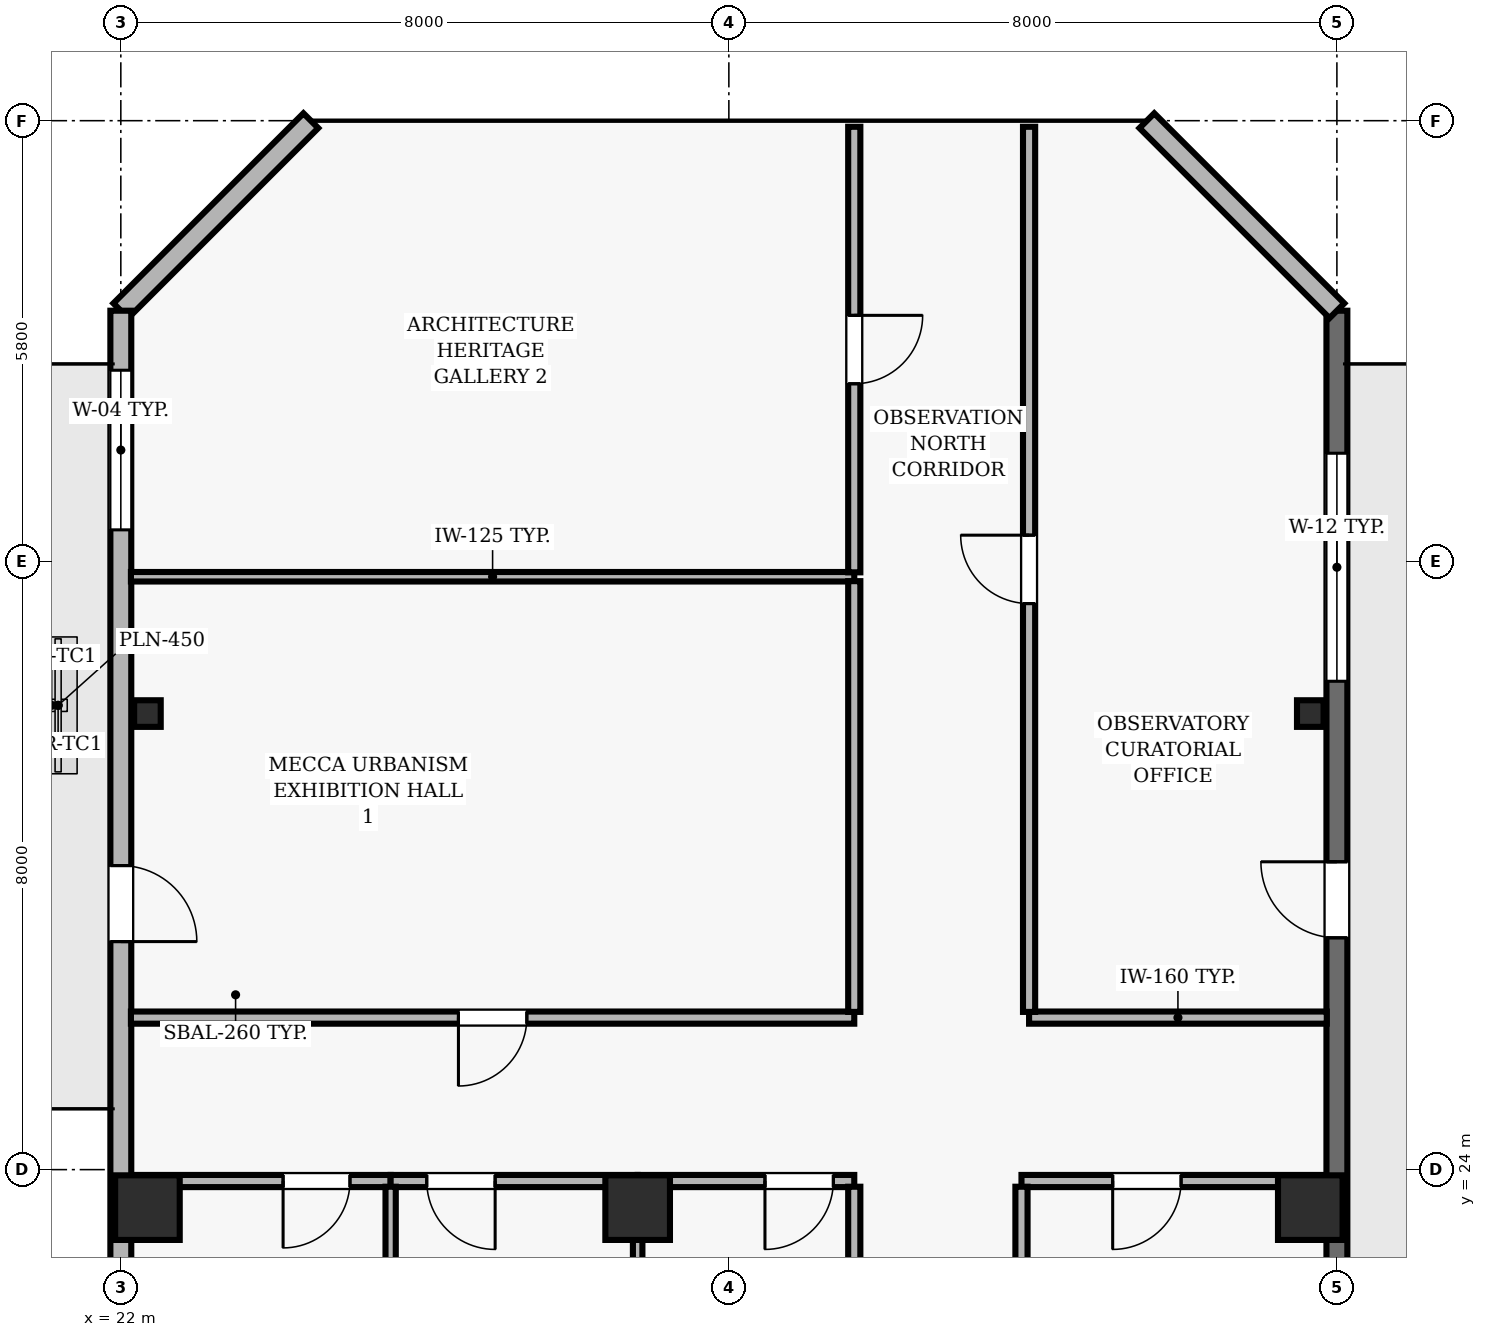
"""IFC4 building model, lengths in metres.
Left out: names, types, materials, properties, quantities, classifications, styles, units other than length and angle.
Written with IfcOpenShell. Run it as: python <this file> out.ifc"""

import sys

from ifc_helpers import new_model, si_unit, direction, frame, frame_2d, origin, origin_2d, place, context, subcontext, project, spatial, rectangle, hollow_rectangle, extrude, element, fill, save


model = new_model("IFC4")
c1 = context("Model", 3, precision=1e-05, world=origin(), true_north=direction((0.0, 1.0)))
c2 = subcontext(c1, "Body", "Model", "MODEL_VIEW")
j1 = project(units=[si_unit("LENGTHUNIT", "METRE"), si_unit("PLANEANGLEUNIT", "RADIAN")], contexts=[c1])
p1 = place(None, origin())
s1 = spatial("IfcSite", under=j1, at=p1, CompositionType="ELEMENT")
p2 = place(p1, origin())
s2 = spatial("IfcBuilding", under=s1, at=p2, CompositionType="ELEMENT")
p3 = place(p2, frame((0.0, 0.0, 306.7)))
s3 = spatial("IfcBuildingStorey", under=s2, at=p3, CompositionType="ELEMENT", Elevation=306.7)
for number, where, z_axis, x_axis in (
    (1, (22.35, 23.5, 0.0), (0.0, 0.0, 1.0), (1.0, 0.0, 0.0)),
    (2, (28.8, 23.5, 0.0), (0.0, 0.0, 1.0), (1.0, 0.0, 0.0)),
    (3, (37.65, 23.5, 0.0), (0.0, 0.0, 1.0), (1.0, 0.0, 0.0)),
):
    element("IfcColumn", number, at=place(p3, frame(where, z_axis=z_axis, x_axis=x_axis)), inside=s3, PredefinedType="COLUMN", context=c2, shape_type="SweptSolid", body=[
        extrude(rectangle(XDim=0.85, YDim=0.85, at=origin_2d()), origin(), (0.0, 0.0, 1.0), 5.0),
    ])
for number, where, z_axis, x_axis in (
    (4, (22.35, 30.0, 0.0), (0.0, 0.0, 1.0), (1.0, 0.0, 0.0)),
    (5, (37.65, 30.0, 0.0), (0.0, 0.0, 1.0), (1.0, 0.0, 0.0)),
):
    element("IfcColumn", number, at=place(p3, frame(where, z_axis=z_axis, x_axis=x_axis)), inside=s3, PredefinedType="COLUMN", context=c2, shape_type="SweptSolid", body=[
        extrude(hollow_rectangle(XDim=0.35, YDim=0.35, WallThickness=0.016, at=origin_2d()), origin(), (0.0, 0.0, 1.0), 5.0),
    ])
p4 = place(p3, frame((38.0, 21.8, 0.0), z_axis=(0.0, 0.0, 1.0), x_axis=(0.0, 1.0, 0.0)))
e6 = element("IfcWall", 6, at=p4, inside=s3, PredefinedType="SOLIDWALL", context=c2, shape_type="SweptSolid", body=[
    extrude(rectangle(XDim=13.5, YDim=0.275, at=frame_2d((6.75, 0.0))), origin(), (0.0, 0.0, 1.0), 4.74),
])
p5 = place(p4, frame((5.25, 0.0, 0.0)))
e7 = element("IfcOpeningElement", 7, at=p5, cuts=e6, PredefinedType="OPENING", context=c2, shape_type="SweptSolid", body=[
    extrude(rectangle(XDim=1.0, YDim=2.2, at=frame_2d((0.5, 1.1))), frame((0.0, 0.147, 0.0), z_axis=(0.0, -1.0, 0.0), x_axis=(1.0, 0.0, 0.0)), (0.0, 0.0, 1.0), 0.295),
])
p6 = place(p4, frame((8.625, 0.0, 0.9)))
e8 = element("IfcOpeningElement", 8, at=p6, cuts=e6, PredefinedType="OPENING", context=c2, shape_type="SweptSolid", body=[
    extrude(rectangle(XDim=3.0, YDim=2.2, at=frame_2d((1.5, 1.1))), frame((0.0, 0.147, 0.0), z_axis=(0.0, -1.0, 0.0), x_axis=(1.0, 0.0, 0.0)), (0.0, 0.0, 1.0), 0.295),
])
for number, where, z_axis, x_axis in (
    (9, (38.0, 35.3, 0.0), (0.0, 0.0, 1.0), (-0.707, 0.707, 0.0)),
    (10, (24.5, 37.8, 0.0), (0.0, 0.0, 1.0), (-0.707, -0.707, 0.0)),
):
    element("IfcWall", number, at=place(p3, frame(where, z_axis=z_axis, x_axis=x_axis)), inside=s3, PredefinedType="SOLIDWALL", context=c2, shape_type="SweptSolid", body=[
        extrude(rectangle(XDim=3.536, YDim=0.275, at=frame_2d((1.768, 0.0))), origin(), (0.0, 0.0, 1.0), 4.74),
    ])
p7 = place(p3, frame((22.0, 35.3, 0.0), z_axis=(0.0, 0.0, 1.0), x_axis=(0.0, -1.0, 0.0)))
e11 = element("IfcWall", 11, at=p7, inside=s3, PredefinedType="SOLIDWALL", context=c2, shape_type="SweptSolid", body=[
    extrude(rectangle(XDim=32.8, YDim=0.275, at=frame_2d((16.4, 0.0))), origin(), (0.0, 0.0, 1.0), 4.74),
])
p8 = place(p7, frame((7.3, 0.0, 0.0)))
e12 = element("IfcOpeningElement", 12, at=p8, cuts=e11, PredefinedType="OPENING", context=c2, shape_type="SweptSolid", body=[
    extrude(rectangle(XDim=1.0, YDim=2.2, at=frame_2d((0.5, 1.1))), frame((0.0, 0.147, 0.0), z_axis=(0.0, -1.0, 0.0), x_axis=(1.0, 0.0, 0.0)), (0.0, 0.0, 1.0), 0.295),
])
p9 = place(p7, frame((0.783, 0.0, 0.9)))
e13 = element("IfcOpeningElement", 13, at=p9, cuts=e11, PredefinedType="OPENING", context=c2, shape_type="SweptSolid", body=[
    extrude(rectangle(XDim=2.1, YDim=1.6, at=frame_2d((1.05, 0.8))), frame((0.0, 0.147, 0.0), z_axis=(0.0, -1.0, 0.0), x_axis=(1.0, 0.0, 0.0)), (0.0, 0.0, 1.0), 0.295),
])
p10 = place(p7, frame((12.617, 0.0, 0.9)))
e14 = element("IfcOpeningElement", 14, at=p10, cuts=e11, PredefinedType="OPENING", context=c2, shape_type="SweptSolid", body=[
    extrude(rectangle(XDim=2.1, YDim=1.6, at=frame_2d((1.05, 0.8))), frame((0.0, 0.147, 0.0), z_axis=(0.0, -1.0, 0.0), x_axis=(1.0, 0.0, 0.0)), (0.0, 0.0, 1.0), 0.295),
])
p11 = place(p7, frame((17.633, 0.0, 0.9)))
e15 = element("IfcOpeningElement", 15, at=p11, cuts=e11, PredefinedType="OPENING", context=c2, shape_type="SweptSolid", body=[
    extrude(rectangle(XDim=2.1, YDim=1.6, at=frame_2d((1.05, 0.8))), frame((0.0, 0.147, 0.0), z_axis=(0.0, -1.0, 0.0), x_axis=(1.0, 0.0, 0.0)), (0.0, 0.0, 1.0), 0.295),
])
p12 = place(p7, frame((23.55, 0.0, 0.9)))
e16 = element("IfcOpeningElement", 16, at=p12, cuts=e11, PredefinedType="OPENING", context=c2, shape_type="SweptSolid", body=[
    extrude(rectangle(XDim=2.1, YDim=1.6, at=frame_2d((1.05, 0.8))), frame((0.0, 0.147, 0.0), z_axis=(0.0, -1.0, 0.0), x_axis=(1.0, 0.0, 0.0)), (0.0, 0.0, 1.0), 0.295),
])
p13 = place(p3, frame((25.55, 23.85, 0.0), z_axis=(0.0, 0.0, 1.0), x_axis=(-1.0, 0.0, 0.0)))
e17 = element("IfcWall", 17, at=p13, inside=s3, PredefinedType="PARTITIONING", context=c2, shape_type="SweptSolid", body=[
    extrude(rectangle(XDim=3.35, YDim=0.16, at=frame_2d((1.675, 0.0))), origin(), (0.0, 0.0, 1.0), 4.277),
])
p14 = place(p13, frame((0.535, 0.0, 0.0)))
e18 = element("IfcOpeningElement", 18, at=p14, cuts=e17, PredefinedType="OPENING", context=c2, shape_type="SweptSolid", body=[
    extrude(rectangle(XDim=0.88, YDim=2.1, at=frame_2d((0.44, 1.05))), frame((0.0, 0.09, 0.0), z_axis=(0.0, -1.0, 0.0), x_axis=(1.0, 0.0, 0.0)), (0.0, 0.0, 1.0), 0.18),
])
p15 = place(p3, frame((28.8, 23.85, 0.0), z_axis=(0.0, 0.0, 1.0), x_axis=(-1.0, 0.0, 0.0)))
e19 = element("IfcWall", 19, at=p15, inside=s3, PredefinedType="PARTITIONING", context=c2, shape_type="SweptSolid", body=[
    extrude(rectangle(XDim=3.25, YDim=0.16, at=frame_2d((1.625, 0.0))), origin(), (0.0, 0.0, 1.0), 4.277),
])
p16 = place(p15, frame((1.875, 0.0, 0.0)))
e20 = element("IfcOpeningElement", 20, at=p16, cuts=e19, PredefinedType="OPENING", context=c2, shape_type="SweptSolid", body=[
    extrude(rectangle(XDim=0.9, YDim=2.1, at=frame_2d((0.45, 1.05))), frame((0.0, 0.09, 0.0), z_axis=(0.0, -1.0, 0.0), x_axis=(1.0, 0.0, 0.0)), (0.0, 0.0, 1.0), 0.18),
])
p17 = place(p3, frame((31.65, 23.85, 0.0), z_axis=(0.0, 0.0, 1.0), x_axis=(-1.0, 0.0, 0.0)))
e21 = element("IfcWall", 21, at=p17, inside=s3, PredefinedType="PARTITIONING", context=c2, shape_type="SweptSolid", body=[
    extrude(rectangle(XDim=2.85, YDim=0.16, at=frame_2d((1.425, 0.0))), origin(), (0.0, 0.0, 1.0), 4.277),
])
p18 = place(p17, frame((0.275, 0.0, 0.0)))
e22 = element("IfcOpeningElement", 22, at=p18, cuts=e21, PredefinedType="OPENING", context=c2, shape_type="SweptSolid", body=[
    extrude(rectangle(XDim=0.9, YDim=2.1, at=frame_2d((0.45, 1.05))), frame((0.0, 0.09, 0.0), z_axis=(0.0, -1.0, 0.0), x_axis=(1.0, 0.0, 0.0)), (0.0, 0.0, 1.0), 0.18),
])
p19 = place(p3, frame((31.65, 26.0, 0.0), z_axis=(0.0, 0.0, 1.0), x_axis=(-1.0, 0.0, 0.0)))
e23 = element("IfcWall", 23, at=p19, inside=s3, PredefinedType="PARTITIONING", context=c2, shape_type="SweptSolid", body=[
    extrude(rectangle(XDim=9.517, YDim=0.16, at=frame_2d((4.758, 0.0))), origin(), (0.0, 0.0, 1.0), 4.74),
])
p20 = place(p19, frame((4.308, 0.0, 0.0)))
e24 = element("IfcOpeningElement", 24, at=p20, cuts=e23, PredefinedType="OPENING", context=c2, shape_type="SweptSolid", body=[
    extrude(rectangle(XDim=0.9, YDim=2.1, at=frame_2d((0.45, 1.05))), frame((0.0, 0.09, 0.0), z_axis=(0.0, -1.0, 0.0), x_axis=(1.0, 0.0, 0.0)), (0.0, 0.0, 1.0), 0.18),
])
p21 = place(p3, frame((31.65, 31.8, 0.0), z_axis=(0.0, 0.0, 1.0), x_axis=(-1.0, 0.0, 0.0)))
e25 = element("IfcWall", 25, at=p21, inside=s3, PredefinedType="PARTITIONING", context=c2, shape_type="SweptSolid", body=[
    extrude(rectangle(XDim=9.517, YDim=0.125, at=frame_2d((4.758, 0.0))), origin(), (0.0, 0.0, 1.0), 4.74),
])
p22 = place(p3, frame((37.85, 23.85, 0.0), z_axis=(0.0, 0.0, 1.0), x_axis=(-1.0, 0.0, 0.0)))
e26 = element("IfcWall", 26, at=p22, inside=s3, PredefinedType="PARTITIONING", context=c2, shape_type="SweptSolid", body=[
    extrude(rectangle(XDim=4.0, YDim=0.16, at=frame_2d((2.0, 0.0))), origin(), (0.0, 0.0, 1.0), 4.277),
])
p23 = place(p22, frame((1.9, 0.0, 0.0)))
e27 = element("IfcOpeningElement", 27, at=p23, cuts=e26, PredefinedType="OPENING", context=c2, shape_type="SweptSolid", body=[
    extrude(rectangle(XDim=0.9, YDim=2.1, at=frame_2d((0.45, 1.05))), frame((0.0, 0.09, 0.0), z_axis=(0.0, -1.0, 0.0), x_axis=(1.0, 0.0, 0.0)), (0.0, 0.0, 1.0), 0.18),
])
p24 = place(p3, frame((37.867, 26.0, 0.0), z_axis=(0.0, 0.0, 1.0), x_axis=(-1.0, 0.0, 0.0)))
e28 = element("IfcWall", 28, at=p24, inside=s3, PredefinedType="PARTITIONING", context=c2, shape_type="SweptSolid", body=[
    extrude(rectangle(XDim=3.917, YDim=0.16, at=frame_2d((1.958, 0.0))), origin(), (0.0, 0.0, 1.0), 4.74),
])
p25 = place(p3, frame((25.55, 19.16, 0.0), z_axis=(0.0, 0.0, 1.0), x_axis=(0.0, 1.0, 0.0)))
e29 = element("IfcWall", 29, at=p25, inside=s3, PredefinedType="PARTITIONING", context=c2, shape_type="SweptSolid", body=[
    extrude(rectangle(XDim=4.615, YDim=0.135, at=frame_2d((2.308, 0.0))), origin(), (0.0, 0.0, 1.0), 4.74),
])
p26 = place(p3, frame((28.8, 23.775, 0.0), z_axis=(0.0, 0.0, 1.0), x_axis=(0.0, -1.0, 0.0)))
e30 = element("IfcWall", 30, at=p26, inside=s3, PredefinedType="PARTITIONING", context=c2, shape_type="SweptSolid", body=[
    extrude(rectangle(XDim=2.267, YDim=0.125, at=frame_2d((1.133, 0.0))), origin(), (0.0, 0.0, 1.0), 4.74),
])
p27 = place(p3, frame((31.65, 23.775, 0.0), z_axis=(0.0, 0.0, 1.0), x_axis=(0.0, -1.0, 0.0)))
e31 = element("IfcWall", 31, at=p27, inside=s3, PredefinedType="PARTITIONING", context=c2, shape_type="SweptSolid", body=[
    extrude(rectangle(XDim=2.267, YDim=0.16, at=frame_2d((1.133, 0.0))), origin(), (0.0, 0.0, 1.0), 4.74),
])
p28 = place(p3, frame((31.65, 31.742, 0.0), z_axis=(0.0, 0.0, 1.0), x_axis=(0.0, -1.0, 0.0)))
e32 = element("IfcWall", 32, at=p28, inside=s3, PredefinedType="PARTITIONING", context=c2, shape_type="SweptSolid", body=[
    extrude(rectangle(XDim=5.667, YDim=0.16, at=frame_2d((2.833, 0.0))), origin(), (0.0, 0.0, 1.0), 4.74),
])
p29 = place(p3, frame((31.65, 37.72, 0.0), z_axis=(0.0, 0.0, 1.0), x_axis=(0.0, -1.0, 0.0)))
e33 = element("IfcWall", 33, at=p29, inside=s3, PredefinedType="PARTITIONING", context=c2, shape_type="SweptSolid", body=[
    extrude(rectangle(XDim=5.862, YDim=0.16, at=frame_2d((2.931, 0.0))), origin(), (0.0, 0.0, 1.0), 4.74),
])
p30 = place(p29, frame((2.481, 0.0, 0.0)))
e34 = element("IfcOpeningElement", 34, at=p30, cuts=e33, PredefinedType="OPENING", context=c2, shape_type="SweptSolid", body=[
    extrude(rectangle(XDim=0.9, YDim=2.1, at=frame_2d((0.45, 1.05))), frame((0.0, 0.09, 0.0), z_axis=(0.0, -1.0, 0.0), x_axis=(1.0, 0.0, 0.0)), (0.0, 0.0, 1.0), 0.18),
])
p31 = place(p3, frame((33.85, 20.835, 0.0), z_axis=(0.0, 0.0, 1.0), x_axis=(0.0, 1.0, 0.0)))
e35 = element("IfcWall", 35, at=p31, inside=s3, PredefinedType="PARTITIONING", context=c2, shape_type="SweptSolid", body=[
    extrude(rectangle(XDim=2.94, YDim=0.16, at=frame_2d((1.47, 0.0))), origin(), (0.0, 0.0, 1.0), 4.74),
])
p32 = place(p3, frame((33.95, 26.075, 0.0), z_axis=(0.0, 0.0, 1.0), x_axis=(0.0, 1.0, 0.0)))
e36 = element("IfcWall", 36, at=p32, inside=s3, PredefinedType="PARTITIONING", context=c2, shape_type="SweptSolid", body=[
    extrude(rectangle(XDim=11.645, YDim=0.16, at=frame_2d((5.823, 0.0))), origin(), (0.0, 0.0, 1.0), 4.74),
])
p33 = place(p32, frame((5.372, 0.0, 0.0)))
e37 = element("IfcOpeningElement", 37, at=p33, cuts=e36, PredefinedType="OPENING", context=c2, shape_type="SweptSolid", body=[
    extrude(rectangle(XDim=0.9, YDim=2.1, at=frame_2d((0.45, 1.05))), frame((0.0, 0.09, 0.0), z_axis=(0.0, -1.0, 0.0), x_axis=(1.0, 0.0, 0.0)), (0.0, 0.0, 1.0), 0.18),
])
p34 = place(p5, origin())
e38 = element("IfcDoor", 38, at=p34, inside=s3, OperationType="SINGLE_SWING_RIGHT", PredefinedType="DOOR", context=c2, shape_type="SweptSolid", body=[
    extrude(rectangle(XDim=1.0, YDim=2.2, at=frame_2d((0.5, 1.1))), frame((0.0, 0.025, 0.0), z_axis=(0.0, -1.0, 0.0), x_axis=(1.0, 0.0, 0.0)), (0.0, 0.0, 1.0), 0.05),
])
fill(e7, e38)
p35 = place(p6, origin())
e39 = element("IfcWindow", 39, at=p35, inside=s3, PartitioningType="SINGLE_PANEL", PredefinedType="WINDOW", context=c2, shape_type="SweptSolid", body=[
    extrude(rectangle(XDim=3.0, YDim=2.2, at=frame_2d((1.5, 1.1))), frame((0.0, 0.03, 0.0), z_axis=(0.0, -1.0, 0.0), x_axis=(1.0, 0.0, 0.0)), (0.0, 0.0, 1.0), 0.06),
])
fill(e8, e39)
p36 = place(p8, origin())
e40 = element("IfcDoor", 40, at=p36, inside=s3, OperationType="SINGLE_SWING_RIGHT", PredefinedType="DOOR", context=c2, shape_type="SweptSolid", body=[
    extrude(rectangle(XDim=1.0, YDim=2.2, at=frame_2d((0.5, 1.1))), frame((0.0, 0.025, 0.0), z_axis=(0.0, -1.0, 0.0), x_axis=(1.0, 0.0, 0.0)), (0.0, 0.0, 1.0), 0.05),
])
fill(e12, e40)
p37 = place(p9, origin())
e41 = element("IfcWindow", 41, at=p37, inside=s3, PartitioningType="SINGLE_PANEL", PredefinedType="WINDOW", context=c2, shape_type="SweptSolid", body=[
    extrude(rectangle(XDim=2.1, YDim=1.6, at=frame_2d((1.05, 0.8))), frame((0.0, 0.03, 0.0), z_axis=(0.0, -1.0, 0.0), x_axis=(1.0, 0.0, 0.0)), (0.0, 0.0, 1.0), 0.06),
])
fill(e13, e41)
p38 = place(p23, origin())
e42 = element("IfcDoor", 42, at=p38, inside=s3, OperationType="SINGLE_SWING_RIGHT", PredefinedType="DOOR", context=c2, shape_type="SweptSolid", body=[
    extrude(rectangle(XDim=0.9, YDim=2.1, at=frame_2d((0.45, 1.05))), frame((0.0, 0.025, 0.0), z_axis=(0.0, -1.0, 0.0), x_axis=(1.0, 0.0, 0.0)), (0.0, 0.0, 1.0), 0.05),
])
fill(e27, e42)
p39 = place(p18, origin())
e43 = element("IfcDoor", 43, at=p39, inside=s3, OperationType="SINGLE_SWING_RIGHT", PredefinedType="DOOR", context=c2, shape_type="SweptSolid", body=[
    extrude(rectangle(XDim=0.9, YDim=2.1, at=frame_2d((0.45, 1.05))), frame((0.0, 0.025, 0.0), z_axis=(0.0, -1.0, 0.0), x_axis=(1.0, 0.0, 0.0)), (0.0, 0.0, 1.0), 0.05),
])
fill(e22, e43)
p40 = place(p14, origin())
e44 = element("IfcDoor", 44, at=p40, inside=s3, OperationType="SINGLE_SWING_RIGHT", PredefinedType="DOOR", context=c2, shape_type="SweptSolid", body=[
    extrude(rectangle(XDim=0.88, YDim=2.1, at=frame_2d((0.44, 1.05))), frame((0.0, 0.025, 0.0), z_axis=(0.0, -1.0, 0.0), x_axis=(1.0, 0.0, 0.0)), (0.0, 0.0, 1.0), 0.05),
])
fill(e18, e44)
p41 = place(p16, origin())
e45 = element("IfcDoor", 45, at=p41, inside=s3, OperationType="SINGLE_SWING_LEFT", PredefinedType="DOOR", context=c2, shape_type="SweptSolid", body=[
    extrude(rectangle(XDim=0.9, YDim=2.1, at=frame_2d((0.45, 1.05))), frame((0.0, 0.025, 0.0), z_axis=(0.0, -1.0, 0.0), x_axis=(1.0, 0.0, 0.0)), (0.0, 0.0, 1.0), 0.05),
])
fill(e20, e45)
p42 = place(p20, origin())
e46 = element("IfcDoor", 46, at=p42, inside=s3, OperationType="SINGLE_SWING_RIGHT", PredefinedType="DOOR", context=c2, shape_type="SweptSolid", body=[
    extrude(rectangle(XDim=0.9, YDim=2.1, at=frame_2d((0.45, 1.05))), frame((0.0, 0.025, 0.0), z_axis=(0.0, -1.0, 0.0), x_axis=(1.0, 0.0, 0.0)), (0.0, 0.0, 1.0), 0.05),
])
fill(e24, e46)
p43 = place(p30, origin())
e47 = element("IfcDoor", 47, at=p43, inside=s3, OperationType="SINGLE_SWING_LEFT", PredefinedType="DOOR", context=c2, shape_type="SweptSolid", body=[
    extrude(rectangle(XDim=0.9, YDim=2.1, at=frame_2d((0.45, 1.05))), frame((0.0, 0.025, 0.0), z_axis=(0.0, -1.0, 0.0), x_axis=(1.0, 0.0, 0.0)), (0.0, 0.0, 1.0), 0.05),
])
fill(e34, e47)
p44 = place(p33, origin())
e48 = element("IfcDoor", 48, at=p44, inside=s3, OperationType="SINGLE_SWING_RIGHT", PredefinedType="DOOR", context=c2, shape_type="SweptSolid", body=[
    extrude(rectangle(XDim=0.9, YDim=2.1, at=frame_2d((0.45, 1.05))), frame((0.0, 0.025, 0.0), z_axis=(0.0, -1.0, 0.0), x_axis=(1.0, 0.0, 0.0)), (0.0, 0.0, 1.0), 0.05),
])
fill(e37, e48)
save(model, sys.argv[1])
